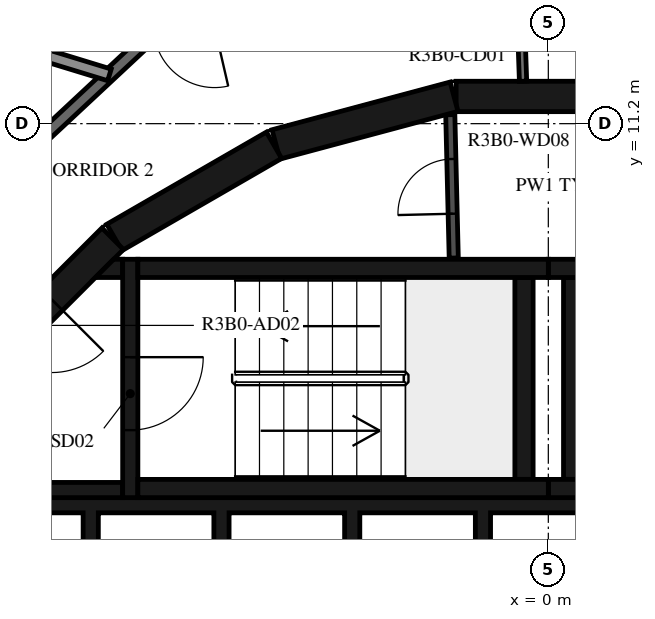
"""IFC4 building model, lengths in metres.
Left out: names, types, materials, properties, quantities, classifications, styles, units other than length and angle.
Written with IfcOpenShell. Run it as: python <this file> out.ifc"""

import sys

from ifc_helpers import new_model, si_unit, direction, frame, frame_2d, origin, place, context, subcontext, project, spatial, polyline, rectangle, outline, extrude, element, fill, save


model = new_model("IFC4")
c1 = context("Model", 3, precision=1e-05, world=origin(), true_north=direction((0.0, 1.0)))
c2 = subcontext(c1, "Body", "Model", "MODEL_VIEW")
j1 = project(units=[si_unit("LENGTHUNIT", "METRE"), si_unit("PLANEANGLEUNIT", "RADIAN")], contexts=[c1])
p1 = place(None, origin())
s1 = spatial("IfcSite", under=j1, at=p1, CompositionType="ELEMENT")
p2 = place(p1, origin())
s2 = spatial("IfcBuilding", under=s1, at=p2, CompositionType="ELEMENT")
p3 = place(p2, frame((0.0, 0.0, 127.4)))
s3 = spatial("IfcBuildingStorey", under=s2, at=p3, CompositionType="ELEMENT", Elevation=127.4)
for number, where, z_axis, x_axis in (
    (1, (1.516, 11.647, 0.0), (0.0, 0.0, 1.0), (-1.0, 0.0, 0.0)),
    (2, (-1.55, 11.643, 0.0), (0.0, 0.0, 1.0), (-0.966, -0.259, 0.0)),
    (3, (-4.51, 10.845, 0.0), (0.0, 0.0, 1.0), (-0.866, -0.5, 0.0)),
):
    element("IfcWall", number, at=place(p3, frame(where, z_axis=z_axis, x_axis=x_axis)), inside=s3, PredefinedType="SHEAR", context=c2, shape_type="SweptSolid", body=[
        extrude(rectangle(XDim=3.033, YDim=0.5, at=frame_2d((1.516, 0.0))), origin(), (0.0, 0.0, 1.0), 3.12),
    ])
p4 = place(p3, frame((-7.164, 9.308, 0.0), z_axis=(0.0, 0.0, 1.0), x_axis=(-0.707106781187, -0.707106781187, 0.0)))
e4 = element("IfcWall", 4, at=p4, inside=s3, PredefinedType="SHEAR", context=c2, shape_type="SweptSolid", body=[
    extrude(rectangle(XDim=3.032, YDim=0.5, at=frame_2d((1.516, 0.0))), origin(), (0.0, 0.0, 1.0), 3.12),
])
p5 = place(p4, frame((1.416, 0.0, 0.0)))
e5 = element("IfcOpeningElement", 5, at=p5, cuts=e4, PredefinedType="OPENING", context=c2, shape_type="SweptSolid", body=[
    extrude(rectangle(XDim=1.2, YDim=2.1, at=frame_2d((0.6, 1.05))), frame((0.0, 0.26, 0.0), z_axis=(0.0, -1.0, 0.0), x_axis=(1.0, 0.0, 0.0)), (0.0, 0.0, 1.0), 0.52),
])
for number, where, z_axis, x_axis in (
    (6, (0.0, 5.2, 0.0), (0.0, 0.0, 1.0), (1.0, 0.0, 0.0)),
    (7, (0.0, 8.82, 0.0), (0.0, 0.0, 1.0), (1.0, 0.0, 0.0)),
):
    element("IfcWall", number, at=place(p3, frame(where, z_axis=z_axis, x_axis=x_axis)), inside=s3, PredefinedType="SHEAR", context=c2, shape_type="SweptSolid", body=[
        extrude(rectangle(XDim=6.75, YDim=0.3, at=frame_2d((3.375, 0.0))), origin(), (0.0, 0.0, 1.0), 3.12),
    ])
p6 = place(p3, frame((0.4, 5.35, 0.0), z_axis=(0.0, 0.0, 1.0), x_axis=(0.0, 1.0, 0.0)))
e8 = element("IfcWall", 8, at=p6, inside=s3, PredefinedType="SHEAR", context=c2, shape_type="SweptSolid", body=[
    extrude(rectangle(XDim=3.32, YDim=0.3, at=frame_2d((1.66, 0.0))), origin(), (0.0, 0.0, 1.0), 3.12),
])
for number, where, z_axis, x_axis in (
    (9, (-6.75, 5.2, 0.0), (0.0, 0.0, 1.0), (1.0, 0.0, 0.0)),
    (10, (-6.75, 8.82, 0.0), (0.0, 0.0, 1.0), (1.0, 0.0, 0.0)),
):
    element("IfcWall", number, at=place(p3, frame(where, z_axis=z_axis, x_axis=x_axis)), inside=s3, PredefinedType="SHEAR", context=c2, shape_type="SweptSolid", body=[
        extrude(rectangle(XDim=6.75, YDim=0.3, at=frame_2d((3.375, 0.0))), origin(), (0.0, 0.0, 1.0), 3.12),
    ])
p7 = place(p3, frame((-0.4, 5.35, 0.0), z_axis=(0.0, 0.0, 1.0), x_axis=(0.0, 1.0, 0.0)))
e11 = element("IfcWall", 11, at=p7, inside=s3, PredefinedType="SHEAR", context=c2, shape_type="SweptSolid", body=[
    extrude(rectangle(XDim=3.32, YDim=0.3, at=frame_2d((1.66, 0.0))), origin(), (0.0, 0.0, 1.0), 3.12),
])
p8 = place(p3, frame((-6.875, 8.97, 0.0), z_axis=(0.0, 0.0, 1.0), x_axis=(0.0, -1.0, 0.0)))
e12 = element("IfcWall", 12, at=p8, inside=s3, PredefinedType="SHEAR", context=c2, shape_type="SweptSolid", body=[
    extrude(rectangle(XDim=3.92, YDim=0.25, at=frame_2d((1.96, 0.0))), origin(), (0.0, 0.0, 1.0), 3.12),
])
p9 = place(p8, frame((1.61, 0.0, 0.0)))
e13 = element("IfcOpeningElement", 13, at=p9, cuts=e12, PredefinedType="OPENING", context=c2, shape_type="SweptSolid", body=[
    extrude(rectangle(XDim=1.2, YDim=2.1, at=frame_2d((0.6, 1.05))), frame((0.0, 0.135, 0.0), z_axis=(0.0, -1.0, 0.0), x_axis=(1.0, 0.0, 0.0)), (0.0, 0.0, 1.0), 0.27),
])
p10 = place(p3, frame((-7.0, 5.175, 0.0), z_axis=(0.0, 0.0, 1.0), x_axis=(-1.0, 0.0, 0.0)))
e14 = element("IfcWall", 14, at=p10, inside=s3, PredefinedType="SHEAR", context=c2, shape_type="SweptSolid", body=[
    extrude(rectangle(XDim=3.1, YDim=0.25, at=frame_2d((1.55, 0.0))), origin(), (0.0, 0.0, 1.0), 3.12),
])
p11 = place(p3, origin())
e15 = element("IfcWall", 15, at=p11, inside=s3, PredefinedType="SHEAR", context=c2, shape_type="SweptSolid", body=[
    extrude(outline(polyline([(-7.148, 8.97), (-7.0, 8.97), (-7.0, 8.67), (-7.448, 8.67), (-7.148, 8.97)])), origin(), (0.0, 0.0, 1.0), 3.12),
])
p12 = place(p3, origin())
e16 = element("IfcWall", 16, at=p12, inside=s3, PredefinedType="SHEAR", context=c2, shape_type="SweptSolid", body=[
    extrude(outline(polyline([(-9.55, 4.8), (-7.65, 4.8), (-7.65, 1.9), (-7.4, 1.9), (-7.4, 4.8), (-5.5, 4.8), (-5.5, 1.9), (-5.25, 1.9), (-5.25, 4.8), (-3.35, 4.8), (-3.35, 1.9), (-3.1, 1.9), (-3.1, 4.8), (-1.2, 4.8), (-1.2, 1.9), (-0.95, 1.9), (-0.95, 4.8), (3.1, 4.8), (3.1, 1.9), (3.35, 1.9), (3.35, 4.8), (5.25, 4.8), (5.25, 1.9), (5.5, 1.9), (5.5, 4.8), (7.4, 4.8), (7.4, 1.9), (7.65, 1.9), (7.65, 4.8), (9.55, 4.8), (9.55, 1.9), (9.8, 1.9), (9.8, 4.8), (9.8, 5.05), (-9.8, 5.05), (-9.8, 4.8), (-9.8, 1.9), (-9.55, 1.9), (-9.55, 4.8)])), origin(), (0.0, 0.0, 1.0), 3.12),
])
p13 = place(p3, frame((-1.555, 8.99, 0.0), z_axis=(0.0, 0.0, 1.0), x_axis=(-0.024125549686, 0.999708936567, 0.0)))
e17 = element("IfcWall", 17, at=p13, inside=s3, PredefinedType="PARTITIONING", context=c2, shape_type="SweptSolid", body=[
    extrude(rectangle(XDim=2.358, YDim=0.15, at=frame_2d((1.179, 0.0))), origin(), (0.0, 0.0, 1.0), 3.12),
])
p14 = place(p13, frame((0.729, 0.0, 0.0)))
e18 = element("IfcOpeningElement", 18, at=p14, cuts=e17, PredefinedType="OPENING", context=c2, shape_type="SweptSolid", body=[
    extrude(rectangle(XDim=0.9, YDim=2.1, at=frame_2d((0.45, 1.05))), frame((0.0, 0.085, 0.0), z_axis=(0.0, -1.0, 0.0), x_axis=(1.0, 0.0, 0.0)), (0.0, 0.0, 1.0), 0.17),
])
p15 = place(p3, frame((-0.487, 13.948, 0.0), z_axis=(0.0, 0.0, 1.0), x_axis=(0.034859752231, -0.999392214135, 0.0)))
e19 = element("IfcWall", 19, at=p15, inside=s3, PredefinedType="PARTITIONING", context=c2, shape_type="SweptSolid", body=[
    extrude(rectangle(XDim=2.052, YDim=0.12, at=frame_2d((1.026, 0.0))), origin(), (0.0, 0.0, 1.0), 3.12),
])
p16 = place(p15, frame((0.125, 0.0, 0.0)))
e20 = element("IfcOpeningElement", 20, at=p16, cuts=e19, PredefinedType="OPENING", context=c2, shape_type="SweptSolid", body=[
    extrude(rectangle(XDim=1.2, YDim=2.1, at=frame_2d((0.6, 1.05))), frame((0.0, 0.07, 0.0), z_axis=(0.0, -1.0, 0.0), x_axis=(1.0, 0.0, 0.0)), (0.0, 0.0, 1.0), 0.14),
])
p17 = place(p3, frame((-6.659, 12.523, 0.0), z_axis=(0.0, 0.0, 1.0), x_axis=(-0.731350455479, -0.682001841105, 0.0)))
e21 = element("IfcWall", 21, at=p17, inside=s3, PredefinedType="STANDARD", context=c2, shape_type="SweptSolid", body=[
    extrude(rectangle(XDim=7.342, YDim=0.2, at=frame_2d((3.671, 0.0))), origin(), (0.0, 0.0, 1.0), 3.12),
])
p18 = place(p17, frame((4.264, 0.0, 0.0)))
e22 = element("IfcOpeningElement", 22, at=p18, cuts=e21, PredefinedType="OPENING", context=c2, shape_type="SweptSolid", body=[
    extrude(rectangle(XDim=1.0, YDim=2.1, at=frame_2d((0.5, 1.05))), frame((0.0, 0.11, 0.0), z_axis=(0.0, -1.0, 0.0), x_axis=(1.0, 0.0, 0.0)), (0.0, 0.0, 1.0), 0.22),
])
p19 = place(p3, frame((-15.327, 14.481, 0.0), z_axis=(0.0, 0.0, 1.0), x_axis=(0.956303504869, -0.292375796837, 0.0)))
e23 = element("IfcWall", 23, at=p19, inside=s3, PredefinedType="STANDARD", context=c2, shape_type="SweptSolid", body=[
    extrude(rectangle(XDim=8.48, YDim=0.2, at=frame_2d((4.24, 0.0))), origin(), (0.0, 0.0, 1.0), 2.73),
])
p20 = place(p3, frame((-7.388, 13.894, 0.0), z_axis=(0.0, 0.0, 1.0), x_axis=(-0.731357186721, -0.681994622729, 0.0)))
e24 = element("IfcWall", 24, at=p20, inside=s3, PredefinedType="PARTITIONING", context=c2, shape_type="SweptSolid", body=[
    extrude(rectangle(XDim=8.146, YDim=0.12, at=frame_2d((4.073, 0.0))), origin(), (0.0, 0.0, 1.0), 3.12),
])
p21 = place(p20, frame((2.432, 0.0, 0.0)))
e25 = element("IfcOpeningElement", 25, at=p21, cuts=e24, PredefinedType="OPENING", context=c2, shape_type="SweptSolid", body=[
    extrude(rectangle(XDim=0.9, YDim=2.1, at=frame_2d((0.45, 1.05))), frame((0.0, 0.07, 0.0), z_axis=(0.0, -1.0, 0.0), x_axis=(1.0, 0.0, 0.0)), (0.0, 0.0, 1.0), 0.14),
])
p22 = place(p20, frame((7.046, 0.0, 0.0)))
e26 = element("IfcOpeningElement", 26, at=p22, cuts=e24, PredefinedType="OPENING", context=c2, shape_type="SweptSolid", body=[
    extrude(rectangle(XDim=0.9, YDim=2.1, at=frame_2d((0.45, 1.05))), frame((0.0, 0.07, 0.0), z_axis=(0.0, -1.0, 0.0), x_axis=(1.0, 0.0, 0.0)), (0.0, 0.0, 1.0), 0.14),
])
p23 = place(p9, origin())
e27 = element("IfcDoor", 27, at=p23, inside=s3, OperationType="SINGLE_SWING_LEFT", PredefinedType="DOOR", context=c2, shape_type="SweptSolid", body=[
    extrude(rectangle(XDim=1.2, YDim=2.1, at=frame_2d((0.6, 1.05))), frame((0.0, 0.025, 0.0), z_axis=(0.0, -1.0, 0.0), x_axis=(1.0, 0.0, 0.0)), (0.0, 0.0, 1.0), 0.05),
])
fill(e13, e27)
p24 = place(p5, origin())
e28 = element("IfcDoor", 28, at=p24, inside=s3, OperationType="SINGLE_SWING_RIGHT", PredefinedType="DOOR", context=c2, shape_type="SweptSolid", body=[
    extrude(rectangle(XDim=1.2, YDim=2.1, at=frame_2d((0.6, 1.05))), frame((0.0, 0.025, 0.0), z_axis=(0.0, -1.0, 0.0), x_axis=(1.0, 0.0, 0.0)), (0.0, 0.0, 1.0), 0.05),
])
fill(e5, e28)
p25 = place(p14, origin())
e29 = element("IfcDoor", 29, at=p25, inside=s3, OperationType="SINGLE_SWING_LEFT", PredefinedType="DOOR", context=c2, shape_type="SweptSolid", body=[
    extrude(rectangle(XDim=0.9, YDim=2.1, at=frame_2d((0.45, 1.05))), frame((0.0, 0.025, 0.0), z_axis=(0.0, -1.0, 0.0), x_axis=(1.0, 0.0, 0.0)), (0.0, 0.0, 1.0), 0.05),
])
fill(e18, e29)
save(model, sys.argv[1])
